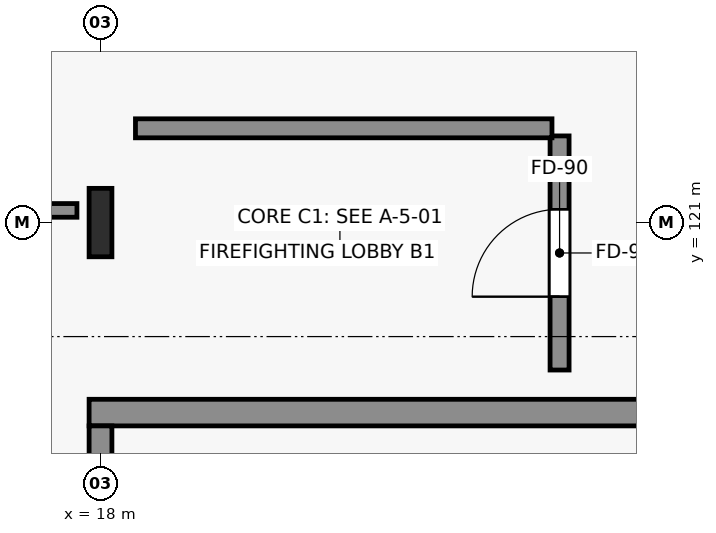
"""IFC4 building model, lengths in metres.
Left out: names, types, materials, properties, quantities, classifications, styles, units other than length and angle.
Written with IfcOpenShell. Run it as: python <this file> out.ifc"""

import sys

from ifc_helpers import new_model, si_unit, direction, frame, frame_2d, origin, origin_2d, place, context, subcontext, project, spatial, rectangle, i_section, extrude, element, fill, save


model = new_model("IFC4")
c1 = context("Model", 3, precision=1e-05, world=origin(), true_north=direction((0.0, 1.0)))
c2 = subcontext(c1, "Body", "Model", "MODEL_VIEW")
j1 = project(units=[si_unit("LENGTHUNIT", "METRE"), si_unit("PLANEANGLEUNIT", "RADIAN")], contexts=[c1])
p1 = place(None, origin())
s1 = spatial("IfcSite", under=j1, at=p1, CompositionType="ELEMENT")
p2 = place(p1, origin())
s2 = spatial("IfcBuilding", under=s1, at=p2, CompositionType="ELEMENT")
p3 = place(p2, frame((0.0, 0.0, -4.8)))
s3 = spatial("IfcBuildingStorey", under=s2, at=p3, CompositionType="ELEMENT", Elevation=-4.8)
p4 = place(p3, frame((18.0, 121.0, 0.0), z_axis=(0.0, 0.0, 1.0), x_axis=(1.0, 0.0, 0.0)))
e1 = element("IfcColumn", 1, at=p4, inside=s3, PredefinedType="COLUMN", context=c2, shape_type="SweptSolid", body=[
    extrude(i_section(OverallWidth=0.3, OverallDepth=0.9, WebThickness=0.019, FlangeThickness=0.035, FilletRadius=0.03, at=origin_2d()), origin(), (0.0, 0.0, 1.0), 4.5),
])
p5 = place(p3, frame((17.85, 118.5, 0.0), z_axis=(0.0, 0.0, 1.0), x_axis=(1.0, 0.0, 0.0)))
e2 = element("IfcWall", 2, at=p5, inside=s3, PredefinedType="SHEAR", context=c2, shape_type="SweptSolid", body=[
    extrude(rectangle(XDim=9.3, YDim=0.35, at=frame_2d((4.65, 0.0))), origin(), (0.0, 0.0, 1.0), 4.5),
])
p6 = place(p3, frame((18.0, 113.5, 0.0), z_axis=(0.0, 0.0, 1.0), x_axis=(0.0, 1.0, 0.0)))
e3 = element("IfcWall", 3, at=p6, inside=s3, PredefinedType="SHEAR", context=c2, shape_type="SweptSolid", body=[
    extrude(rectangle(XDim=4.825, YDim=0.3, at=frame_2d((2.413, 0.0))), origin(), (0.0, 0.0, 1.0), 4.5),
])
p7 = place(p3, frame((17.69, 121.16, 0.0), z_axis=(0.0, 0.0, 1.0), x_axis=(-1.0, 0.0, 0.0)))
e4 = element("IfcWall", 4, at=p7, inside=s3, PredefinedType="PARTITIONING", context=c2, shape_type="SweptSolid", body=[
    extrude(rectangle(XDim=16.98, YDim=0.18, at=frame_2d((8.49, 0.0))), origin(), (0.0, 0.0, 1.0), 3.87),
])
p8 = place(p7, frame((5.554, 0.0, 0.0)))
e5 = element("IfcOpeningElement", 5, at=p8, cuts=e4, PredefinedType="OPENING", context=c2, shape_type="SweptSolid", body=[
    extrude(rectangle(XDim=1.3, YDim=2.25, at=frame_2d((0.65, 1.125))), frame((0.0, 0.1, 0.0), z_axis=(0.0, -1.0, 0.0), x_axis=(1.0, 0.0, 0.0)), (0.0, 0.0, 1.0), 0.2),
])
p9 = place(p3, frame((24.04, 119.06, 0.0), z_axis=(0.0, 0.0, 1.0), x_axis=(0.0, 1.0, 0.0)))
e6 = element("IfcWall", 6, at=p9, inside=s3, PredefinedType="SOLIDWALL", context=c2, shape_type="SweptSolid", body=[
    extrude(rectangle(XDim=3.08, YDim=0.25, at=frame_2d((1.54, 0.0))), origin(), (0.0, 0.0, 1.0), 3.87),
])
p10 = place(p9, frame((0.965, 0.0, 0.0)))
e7 = element("IfcOpeningElement", 7, at=p10, cuts=e6, PredefinedType="OPENING", context=c2, shape_type="SweptSolid", body=[
    extrude(rectangle(XDim=1.15, YDim=2.2, at=frame_2d((0.575, 1.1))), frame((0.0, 0.135, 0.0), z_axis=(0.0, -1.0, 0.0), x_axis=(1.0, 0.0, 0.0)), (0.0, 0.0, 1.0), 0.27),
])
p11 = place(p3, frame((18.46, 122.24, 0.0), z_axis=(0.0, 0.0, 1.0), x_axis=(1.0, 0.0, 0.0)))
e8 = element("IfcWall", 8, at=p11, inside=s3, PredefinedType="SOLIDWALL", context=c2, shape_type="SweptSolid", body=[
    extrude(rectangle(XDim=5.48, YDim=0.25, at=frame_2d((2.74, 0.0))), origin(), (0.0, 0.0, 1.0), 4.2),
])
p12 = place(p10, origin())
e9 = element("IfcDoor", 9, at=p12, inside=s3, OperationType="SINGLE_SWING_LEFT", PredefinedType="DOOR", context=c2, shape_type="SweptSolid", body=[
    extrude(rectangle(XDim=1.15, YDim=2.2, at=frame_2d((0.575, 1.1))), frame((0.0, 0.025, 0.0), z_axis=(0.0, -1.0, 0.0), x_axis=(1.0, 0.0, 0.0)), (0.0, 0.0, 1.0), 0.05),
])
fill(e7, e9)
save(model, sys.argv[1])
